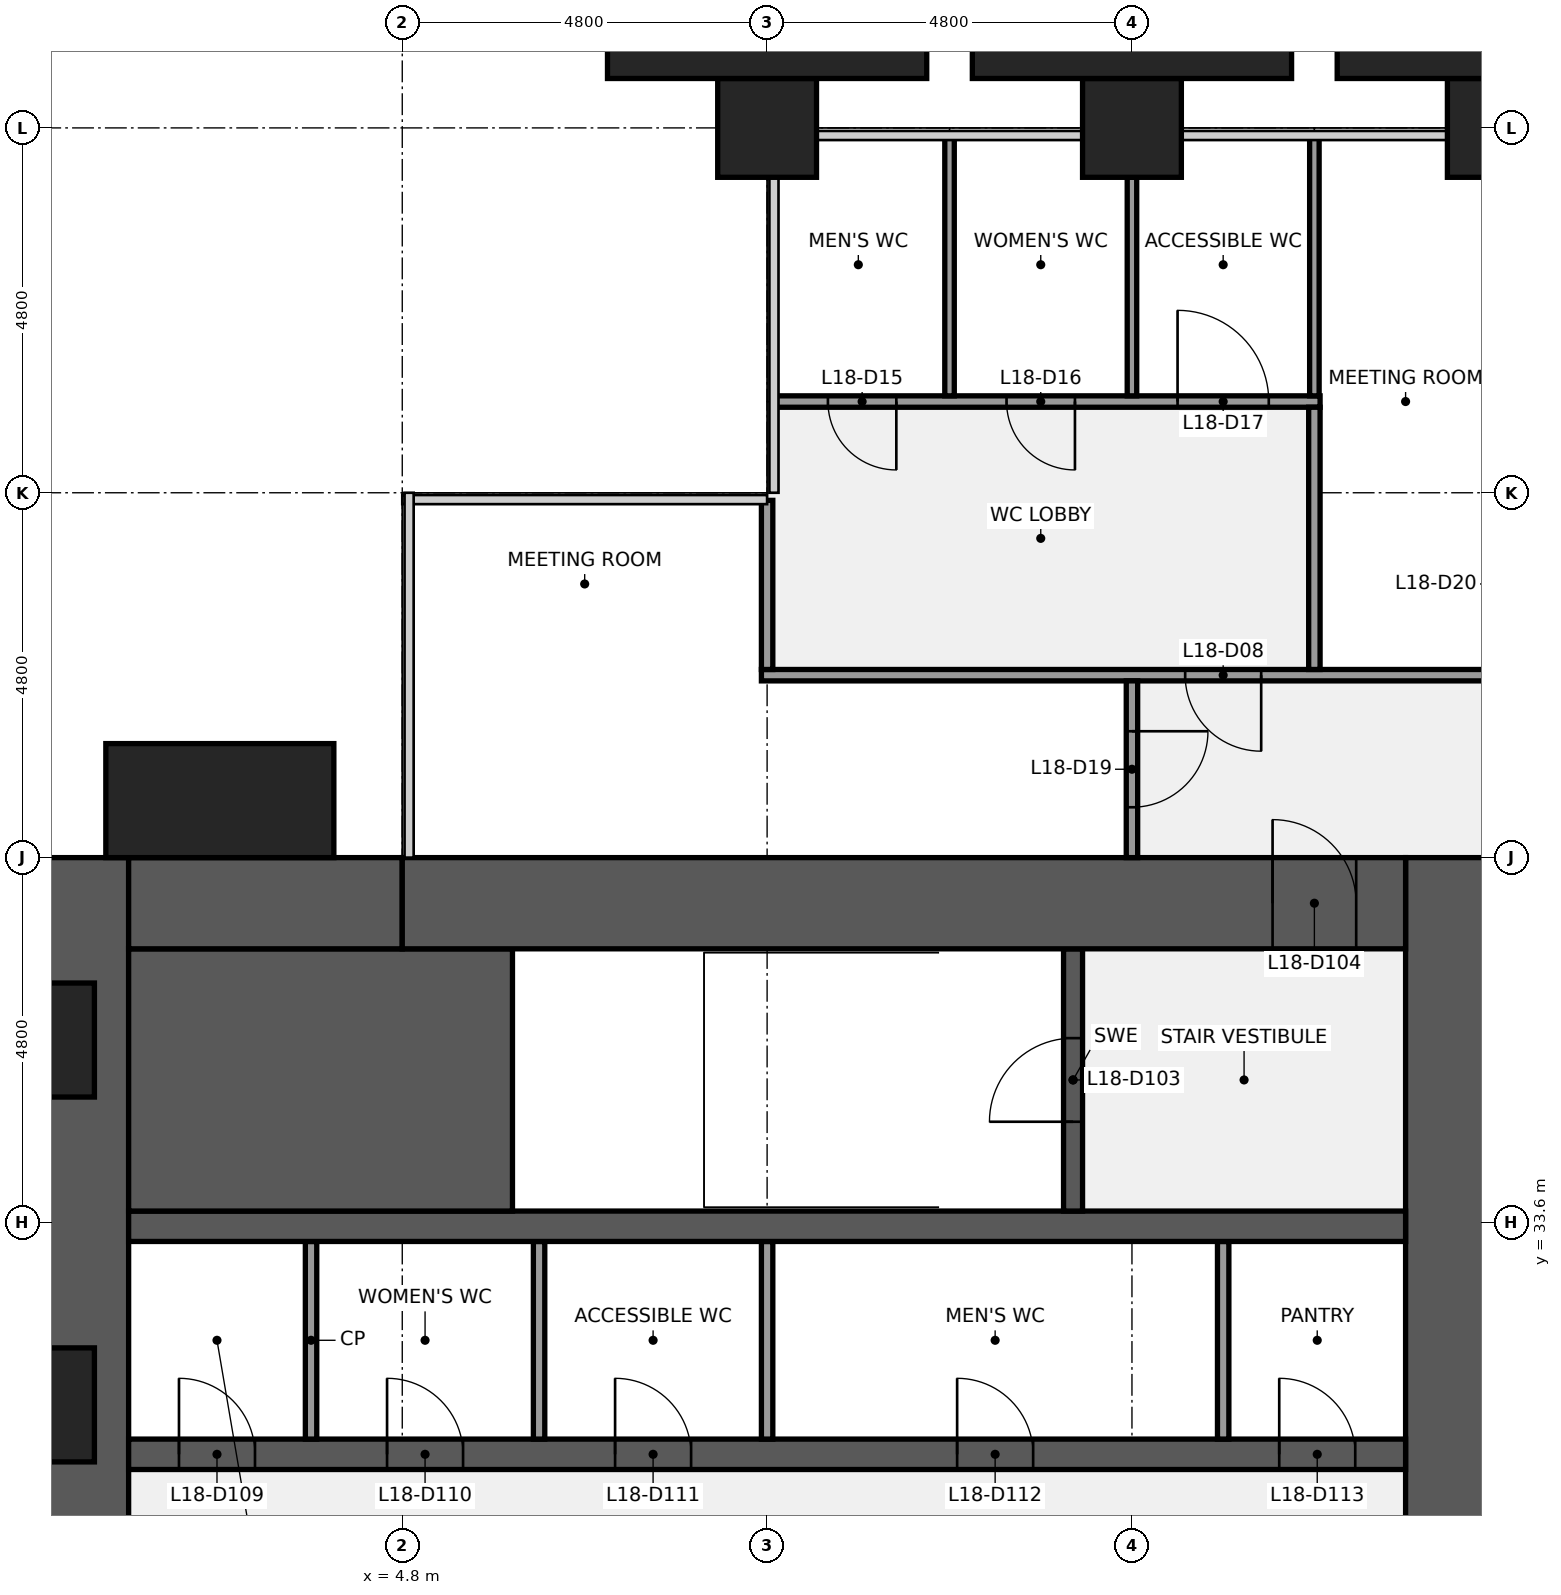
"""IFC4 building model, lengths in metres.
Left out: names, types, materials, properties, quantities, classifications, styles, units other than length and angle.
Written with IfcOpenShell. Run it as: python <this file> out.ifc"""

import sys

from ifc_helpers import new_model, si_unit, direction, frame, frame_2d, origin, origin_2d, place, context, subcontext, project, spatial, rectangle, extrude, element, fill, save


model = new_model("IFC4")
c1 = context("Model", 3, precision=1e-05, world=origin(), true_north=direction((0.0, 1.0)))
c2 = subcontext(c1, "Body", "Model", "MODEL_VIEW")
j1 = project(units=[si_unit("LENGTHUNIT", "METRE"), si_unit("PLANEANGLEUNIT", "RADIAN")], contexts=[c1])
p1 = place(None, origin())
s1 = spatial("IfcSite", under=j1, at=p1, CompositionType="ELEMENT")
p2 = place(p1, origin())
s2 = spatial("IfcBuilding", under=s1, at=p2, CompositionType="ELEMENT")
p3 = place(p2, frame((0.0, 0.0, 83.0)))
s3 = spatial("IfcBuildingStorey", under=s2, at=p3, CompositionType="ELEMENT", Elevation=83.0)
for number, where, z_axis, x_axis in (
    (1, (9.6, 48.0, 0.0), (0.0, 0.0, 1.0), (1.0, 0.0, 0.0)),
    (2, (14.4, 48.0, 0.0), (0.0, 0.0, 1.0), (1.0, 0.0, 0.0)),
    (3, (19.2, 48.0, 0.0), (0.0, 0.0, 1.0), (1.0, 0.0, 0.0)),
):
    element("IfcColumn", number, at=place(p3, frame(where, z_axis=z_axis, x_axis=x_axis)), inside=s3, PredefinedType="COLUMN", context=c2, shape_type="SweptSolid", body=[
        extrude(rectangle(XDim=1.3, YDim=1.3, at=origin_2d()), origin(), (0.0, 0.0, 1.0), 4.0),
    ])
p4 = place(p3, frame((0.6, 9.6, 0.0), z_axis=(0.0, 0.0, 1.0), x_axis=(0.0, 1.0, 0.0)))
e4 = element("IfcWall", 4, at=p4, inside=s3, PredefinedType="SHEAR", context=c2, shape_type="SweptSolid", body=[
    extrude(rectangle(XDim=28.8, YDim=1.2, at=frame_2d((14.4, 0.0))), origin(), (0.0, 0.0, 1.0), 3.7),
])
p5 = place(p4, frame((8.85, 0.0, 0.9)))
e5 = element("IfcOpeningElement", 5, at=p5, cuts=e4, PredefinedType="OPENING", context=c2, shape_type="SweptSolid", body=[
    extrude(rectangle(XDim=1.5, YDim=1.5, at=frame_2d((0.75, 0.75))), frame((0.0, 0.61, 0.0), z_axis=(0.0, -1.0, 0.0), x_axis=(1.0, 0.0, 0.0)), (0.0, 0.0, 1.0), 1.22),
])
p6 = place(p4, frame((18.45, 0.0, 0.9)))
e6 = element("IfcOpeningElement", 6, at=p6, cuts=e4, PredefinedType="OPENING", context=c2, shape_type="SweptSolid", body=[
    extrude(rectangle(XDim=1.5, YDim=1.5, at=frame_2d((0.75, 0.75))), frame((0.0, 0.61, 0.0), z_axis=(0.0, -1.0, 0.0), x_axis=(1.0, 0.0, 0.0)), (0.0, 0.0, 1.0), 1.22),
])
p7 = place(p3, frame((18.6, 38.4, 0.0), z_axis=(0.0, 0.0, 1.0), x_axis=(0.0, -1.0, 0.0)))
e7 = element("IfcWall", 7, at=p7, inside=s3, PredefinedType="SHEAR", context=c2, shape_type="SweptSolid", body=[
    extrude(rectangle(XDim=28.8, YDim=1.2, at=frame_2d((14.4, 0.0))), origin(), (0.0, 0.0, 1.0), 3.7),
])
p8 = place(p7, frame((18.3, 0.0, 0.0)))
e8 = element("IfcOpeningElement", 8, at=p8, cuts=e7, PredefinedType="OPENING", context=c2, shape_type="SweptSolid", body=[
    extrude(rectangle(XDim=1.8, YDim=2.1, at=frame_2d((0.9, 1.05))), frame((0.0, 0.61, 0.0), z_axis=(0.0, -1.0, 0.0), x_axis=(1.0, 0.0, 0.0)), (0.0, 0.0, 1.0), 1.22),
])
p9 = place(p7, frame((8.7, 0.0, 0.0)))
e9 = element("IfcOpeningElement", 9, at=p9, cuts=e7, PredefinedType="OPENING", context=c2, shape_type="SweptSolid", body=[
    extrude(rectangle(XDim=1.8, YDim=2.1, at=frame_2d((0.9, 1.05))), frame((0.0, 0.61, 0.0), z_axis=(0.0, -1.0, 0.0), x_axis=(1.0, 0.0, 0.0)), (0.0, 0.0, 1.0), 1.22),
])
p10 = place(p3, frame((1.2, 30.55, 0.0), z_axis=(0.0, 0.0, 1.0), x_axis=(1.0, 0.0, 0.0)))
e10 = element("IfcWall", 10, at=p10, inside=s3, PredefinedType="SHEAR", context=c2, shape_type="SweptSolid", body=[
    extrude(rectangle(XDim=16.8, YDim=0.4, at=frame_2d((8.4, 0.0))), origin(), (0.0, 0.0, 1.0), 3.7),
])
p11 = place(p10, frame((0.663, 0.0, 0.0)))
e11 = element("IfcOpeningElement", 11, at=p11, cuts=e10, PredefinedType="OPENING", context=c2, shape_type="SweptSolid", body=[
    extrude(rectangle(XDim=1.0, YDim=2.1, at=frame_2d((0.5, 1.05))), frame((0.0, 0.21, 0.0), z_axis=(0.0, -1.0, 0.0), x_axis=(1.0, 0.0, 0.0)), (0.0, 0.0, 1.0), 0.42),
])
p12 = place(p10, frame((3.4, 0.0, 0.0)))
e12 = element("IfcOpeningElement", 12, at=p12, cuts=e10, PredefinedType="OPENING", context=c2, shape_type="SweptSolid", body=[
    extrude(rectangle(XDim=1.0, YDim=2.1, at=frame_2d((0.5, 1.05))), frame((0.0, 0.21, 0.0), z_axis=(0.0, -1.0, 0.0), x_axis=(1.0, 0.0, 0.0)), (0.0, 0.0, 1.0), 0.42),
])
p13 = place(p10, frame((6.4, 0.0, 0.0)))
e13 = element("IfcOpeningElement", 13, at=p13, cuts=e10, PredefinedType="OPENING", context=c2, shape_type="SweptSolid", body=[
    extrude(rectangle(XDim=1.0, YDim=2.1, at=frame_2d((0.5, 1.05))), frame((0.0, 0.21, 0.0), z_axis=(0.0, -1.0, 0.0), x_axis=(1.0, 0.0, 0.0)), (0.0, 0.0, 1.0), 0.42),
])
p14 = place(p10, frame((10.9, 0.0, 0.0)))
e14 = element("IfcOpeningElement", 14, at=p14, cuts=e10, PredefinedType="OPENING", context=c2, shape_type="SweptSolid", body=[
    extrude(rectangle(XDim=1.0, YDim=2.1, at=frame_2d((0.5, 1.05))), frame((0.0, 0.21, 0.0), z_axis=(0.0, -1.0, 0.0), x_axis=(1.0, 0.0, 0.0)), (0.0, 0.0, 1.0), 0.42),
])
p15 = place(p10, frame((15.137, 0.0, 0.0)))
e15 = element("IfcOpeningElement", 15, at=p15, cuts=e10, PredefinedType="OPENING", context=c2, shape_type="SweptSolid", body=[
    extrude(rectangle(XDim=1.0, YDim=2.1, at=frame_2d((0.5, 1.05))), frame((0.0, 0.21, 0.0), z_axis=(0.0, -1.0, 0.0), x_axis=(1.0, 0.0, 0.0)), (0.0, 0.0, 1.0), 0.42),
])
for number, where, z_axis, x_axis in (
    (16, (3.6, 30.75, 0.0), (0.0, 0.0, 1.0), (0.0, 1.0, 0.0)),
    (17, (6.6, 30.75, 0.0), (0.0, 0.0, 1.0), (0.0, 1.0, 0.0)),
    (18, (9.6, 30.75, 0.0), (0.0, 0.0, 1.0), (0.0, 1.0, 0.0)),
    (19, (15.6, 30.75, 0.0), (0.0, 0.0, 1.0), (0.0, 1.0, 0.0)),
):
    element("IfcWall", number, at=place(p3, frame(where, z_axis=z_axis, x_axis=x_axis)), inside=s3, PredefinedType="PARTITIONING", context=c2, shape_type="SweptSolid", body=[
        extrude(rectangle(XDim=2.6, YDim=0.15, at=frame_2d((1.3, 0.0))), origin(), (0.0, 0.0, 1.0), 3.7),
    ])
p16 = place(p3, frame((1.2, 33.55, 0.0), z_axis=(0.0, 0.0, 1.0), x_axis=(1.0, 0.0, 0.0)))
e20 = element("IfcWall", 20, at=p16, inside=s3, PredefinedType="SHEAR", context=c2, shape_type="SweptSolid", body=[
    extrude(rectangle(XDim=16.8, YDim=0.4, at=frame_2d((8.4, 0.0))), origin(), (0.0, 0.0, 1.0), 3.7),
])
p17 = place(p3, frame((1.2, 35.475, 0.0), z_axis=(0.0, 0.0, 1.0), x_axis=(1.0, 0.0, 0.0)))
e21 = element("IfcWall", 21, at=p17, inside=s3, PredefinedType="SHEAR", context=c2, shape_type="SweptSolid", body=[
    extrude(rectangle(XDim=5.05, YDim=3.45, at=frame_2d((2.525, 0.0))), origin(), (0.0, 0.0, 1.0), 3.7),
])
p18 = place(p3, frame((13.625, 33.75, 0.0), z_axis=(0.0, 0.0, 1.0), x_axis=(0.0, 1.0, 0.0)))
e22 = element("IfcWall", 22, at=p18, inside=s3, PredefinedType="SHEAR", context=c2, shape_type="SweptSolid", body=[
    extrude(rectangle(XDim=3.45, YDim=0.25, at=frame_2d((1.725, 0.0))), origin(), (0.0, 0.0, 1.0), 3.7),
])
p19 = place(p18, frame((1.175, 0.0, 0.0)))
e23 = element("IfcOpeningElement", 23, at=p19, cuts=e22, PredefinedType="OPENING", context=c2, shape_type="SweptSolid", body=[
    extrude(rectangle(XDim=1.1, YDim=2.1, at=frame_2d((0.55, 1.05))), frame((0.0, 0.135, 0.0), z_axis=(0.0, -1.0, 0.0), x_axis=(1.0, 0.0, 0.0)), (0.0, 0.0, 1.0), 0.27),
])
p20 = place(p3, frame((1.2, 37.8, 0.0), z_axis=(0.0, 0.0, 1.0), x_axis=(1.0, 0.0, 0.0)))
e24 = element("IfcWall", 24, at=p20, inside=s3, PredefinedType="SHEAR", context=c2, shape_type="SweptSolid", body=[
    extrude(rectangle(XDim=3.6, YDim=1.2, at=frame_2d((1.8, 0.0))), origin(), (0.0, 0.0, 1.0), 3.7),
])
p21 = place(p3, frame((4.8, 37.8, 0.0), z_axis=(0.0, 0.0, 1.0), x_axis=(1.0, 0.0, 0.0)))
e25 = element("IfcWall", 25, at=p21, inside=s3, PredefinedType="SHEAR", context=c2, shape_type="SweptSolid", body=[
    extrude(rectangle(XDim=13.2, YDim=1.2, at=frame_2d((6.6, 0.0))), origin(), (0.0, 0.0, 1.0), 3.7),
])
p22 = place(p21, frame((11.45, 0.0, 0.0)))
e26 = element("IfcOpeningElement", 26, at=p22, cuts=e25, PredefinedType="OPENING", context=c2, shape_type="SweptSolid", body=[
    extrude(rectangle(XDim=1.1, YDim=2.1, at=frame_2d((0.55, 1.05))), frame((0.0, 0.61, 0.0), z_axis=(0.0, -1.0, 0.0), x_axis=(1.0, 0.0, 0.0)), (0.0, 0.0, 1.0), 1.22),
])
p23 = place(p3, frame((9.525, 40.8, 0.0), z_axis=(0.0, 0.0, 1.0), x_axis=(1.0, 0.0, 0.0)))
e27 = element("IfcWall", 27, at=p23, inside=s3, PredefinedType="PARTITIONING", context=c2, shape_type="SweptSolid", body=[
    extrude(rectangle(XDim=9.75, YDim=0.15, at=frame_2d((4.875, 0.0))), origin(), (0.0, 0.0, 1.0), 2.709),
])
p24 = place(p23, frame((5.575, 0.0, 0.0)))
e28 = element("IfcOpeningElement", 28, at=p24, cuts=e27, PredefinedType="OPENING", context=c2, shape_type="SweptSolid", body=[
    extrude(rectangle(XDim=1.0, YDim=2.1, at=frame_2d((0.5, 1.05))), frame((0.0, 0.085, 0.0), z_axis=(0.0, -1.0, 0.0), x_axis=(1.0, 0.0, 0.0)), (0.0, 0.0, 1.0), 0.17),
])
p25 = place(p3, frame((9.7, 44.4, 0.0), z_axis=(0.0, 0.0, 1.0), x_axis=(1.0, 0.0, 0.0)))
e29 = element("IfcWall", 29, at=p25, inside=s3, PredefinedType="PARTITIONING", context=c2, shape_type="SweptSolid", body=[
    extrude(rectangle(XDim=7.175, YDim=0.15, at=frame_2d((3.587, 0.0))), origin(), (0.0, 0.0, 1.0), 2.709),
])
p26 = place(p25, frame((0.7, 0.0, 0.0)))
e30 = element("IfcOpeningElement", 30, at=p26, cuts=e29, PredefinedType="OPENING", context=c2, shape_type="SweptSolid", body=[
    extrude(rectangle(XDim=0.9, YDim=2.1, at=frame_2d((0.45, 1.05))), frame((0.0, 0.085, 0.0), z_axis=(0.0, -1.0, 0.0), x_axis=(1.0, 0.0, 0.0)), (0.0, 0.0, 1.0), 0.17),
])
p27 = place(p25, frame((3.05, 0.0, 0.0)))
e31 = element("IfcOpeningElement", 31, at=p27, cuts=e29, PredefinedType="OPENING", context=c2, shape_type="SweptSolid", body=[
    extrude(rectangle(XDim=0.9, YDim=2.1, at=frame_2d((0.45, 1.05))), frame((0.0, 0.085, 0.0), z_axis=(0.0, -1.0, 0.0), x_axis=(1.0, 0.0, 0.0)), (0.0, 0.0, 1.0), 0.17),
])
p28 = place(p25, frame((5.3, 0.0, 0.0)))
e32 = element("IfcOpeningElement", 32, at=p28, cuts=e29, PredefinedType="OPENING", context=c2, shape_type="SweptSolid", body=[
    extrude(rectangle(XDim=1.2, YDim=2.1, at=frame_2d((0.6, 1.05))), frame((0.0, 0.085, 0.0), z_axis=(0.0, -1.0, 0.0), x_axis=(1.0, 0.0, 0.0)), (0.0, 0.0, 1.0), 0.17),
])
p29 = place(p3, frame((9.6, 40.875, 0.0), z_axis=(0.0, 0.0, 1.0), x_axis=(0.0, 1.0, 0.0)))
e33 = element("IfcWall", 33, at=p29, inside=s3, PredefinedType="PARTITIONING", context=c2, shape_type="SweptSolid", body=[
    extrude(rectangle(XDim=2.225, YDim=0.15, at=frame_2d((1.113, 0.0))), origin(), (0.0, 0.0, 1.0), 2.709),
])
p30 = place(p3, frame((12.0, 44.475, 0.0), z_axis=(0.0, 0.0, 1.0), x_axis=(0.0, 1.0, 0.0)))
e34 = element("IfcWall", 34, at=p30, inside=s3, PredefinedType="PARTITIONING", context=c2, shape_type="SweptSolid", body=[
    extrude(rectangle(XDim=3.425, YDim=0.125, at=frame_2d((1.712, 0.0))), origin(), (0.0, 0.0, 1.0), 2.709),
])
p31 = place(p3, frame((14.4, 44.475, 0.0), z_axis=(0.0, 0.0, 1.0), x_axis=(0.0, 1.0, 0.0)))
e35 = element("IfcWall", 35, at=p31, inside=s3, PredefinedType="PARTITIONING", context=c2, shape_type="SweptSolid", body=[
    extrude(rectangle(XDim=2.875, YDim=0.125, at=frame_2d((1.438, 0.0))), origin(), (0.0, 0.0, 1.0), 2.709),
])
p32 = place(p3, frame((14.4, 38.4, 0.0), z_axis=(0.0, 0.0, 1.0), x_axis=(0.0, 1.0, 0.0)))
e36 = element("IfcWall", 36, at=p32, inside=s3, PredefinedType="PARTITIONING", context=c2, shape_type="SweptSolid", body=[
    extrude(rectangle(XDim=2.325, YDim=0.15, at=frame_2d((1.163, 0.0))), origin(), (0.0, 0.0, 1.0), 2.709),
])
p33 = place(p32, frame((0.663, 0.0, 0.0)))
e37 = element("IfcOpeningElement", 37, at=p33, cuts=e36, PredefinedType="OPENING", context=c2, shape_type="SweptSolid", body=[
    extrude(rectangle(XDim=1.0, YDim=2.1, at=frame_2d((0.5, 1.05))), frame((0.0, 0.085, 0.0), z_axis=(0.0, -1.0, 0.0), x_axis=(1.0, 0.0, 0.0)), (0.0, 0.0, 1.0), 0.17),
])
p34 = place(p3, frame((16.8, 44.475, 0.0), z_axis=(0.0, 0.0, 1.0), x_axis=(0.0, 1.0, 0.0)))
e38 = element("IfcWall", 38, at=p34, inside=s3, PredefinedType="PARTITIONING", context=c2, shape_type="SweptSolid", body=[
    extrude(rectangle(XDim=3.425, YDim=0.125, at=frame_2d((1.712, 0.0))), origin(), (0.0, 0.0, 1.0), 2.709),
])
p35 = place(p3, frame((16.8, 40.875, 0.0), z_axis=(0.0, 0.0, 1.0), x_axis=(0.0, 1.0, 0.0)))
e39 = element("IfcWall", 39, at=p35, inside=s3, PredefinedType="PARTITIONING", context=c2, shape_type="SweptSolid", body=[
    extrude(rectangle(XDim=3.45, YDim=0.15, at=frame_2d((1.725, 0.0))), origin(), (0.0, 0.0, 1.0), 2.709),
])
p36 = place(p3, frame((2.4, 39.15, 0.0), z_axis=(0.0, 0.0, 1.0), x_axis=(1.0, 0.0, 0.0)))
e40 = element("IfcColumn", 40, at=p36, inside=s3, PredefinedType="PILASTER", context=c2, shape_type="SweptSolid", body=[
    extrude(rectangle(XDim=3.0, YDim=1.5, at=origin_2d()), origin(), (0.0, 0.0, 1.0), 4.0),
])
for number, where, z_axis, x_axis in (
    (41, (9.6, 49.075, 0.0), (0.0, 0.0, 1.0), (1.0, 0.0, 0.0)),
    (42, (14.4, 49.075, 0.0), (0.0, 0.0, 1.0), (1.0, 0.0, 0.0)),
    (43, (19.2, 49.075, 0.0), (0.0, 0.0, 1.0), (1.0, 0.0, 0.0)),
):
    element("IfcColumn", number, at=place(p3, frame(where, z_axis=z_axis, x_axis=x_axis)), inside=s3, PredefinedType="PILASTER", context=c2, shape_type="SweptSolid", body=[
        extrude(rectangle(XDim=4.2, YDim=0.85, at=origin_2d()), origin(), (0.0, 0.0, 1.0), 4.0),
    ])
p37 = place(p19, origin())
e44 = element("IfcDoor", 44, at=p37, inside=s3, OperationType="SINGLE_SWING_LEFT", PredefinedType="DOOR", context=c2, shape_type="SweptSolid", body=[
    extrude(rectangle(XDim=1.1, YDim=2.1, at=frame_2d((0.55, 1.05))), frame((0.0, 0.025, 0.0), z_axis=(0.0, -1.0, 0.0), x_axis=(1.0, 0.0, 0.0)), (0.0, 0.0, 1.0), 0.05),
])
fill(e23, e44)
p38 = place(p22, origin())
e45 = element("IfcDoor", 45, at=p38, inside=s3, OperationType="SINGLE_SWING_LEFT", PredefinedType="DOOR", context=c2, shape_type="SweptSolid", body=[
    extrude(rectangle(XDim=1.1, YDim=2.1, at=frame_2d((0.55, 1.05))), frame((0.0, 0.025, 0.0), z_axis=(0.0, -1.0, 0.0), x_axis=(1.0, 0.0, 0.0)), (0.0, 0.0, 1.0), 0.05),
])
fill(e26, e45)
p39 = place(p11, origin())
e46 = element("IfcDoor", 46, at=p39, inside=s3, OperationType="SINGLE_SWING_LEFT", PredefinedType="DOOR", context=c2, shape_type="SweptSolid", body=[
    extrude(rectangle(XDim=1.0, YDim=2.1, at=frame_2d((0.5, 1.05))), frame((0.0, 0.025, 0.0), z_axis=(0.0, -1.0, 0.0), x_axis=(1.0, 0.0, 0.0)), (0.0, 0.0, 1.0), 0.05),
])
fill(e11, e46)
p40 = place(p12, origin())
e47 = element("IfcDoor", 47, at=p40, inside=s3, OperationType="SINGLE_SWING_LEFT", PredefinedType="DOOR", context=c2, shape_type="SweptSolid", body=[
    extrude(rectangle(XDim=1.0, YDim=2.1, at=frame_2d((0.5, 1.05))), frame((0.0, 0.025, 0.0), z_axis=(0.0, -1.0, 0.0), x_axis=(1.0, 0.0, 0.0)), (0.0, 0.0, 1.0), 0.05),
])
fill(e12, e47)
p41 = place(p13, origin())
e48 = element("IfcDoor", 48, at=p41, inside=s3, OperationType="SINGLE_SWING_LEFT", PredefinedType="DOOR", context=c2, shape_type="SweptSolid", body=[
    extrude(rectangle(XDim=1.0, YDim=2.1, at=frame_2d((0.5, 1.05))), frame((0.0, 0.025, 0.0), z_axis=(0.0, -1.0, 0.0), x_axis=(1.0, 0.0, 0.0)), (0.0, 0.0, 1.0), 0.05),
])
fill(e13, e48)
p42 = place(p14, origin())
e49 = element("IfcDoor", 49, at=p42, inside=s3, OperationType="SINGLE_SWING_LEFT", PredefinedType="DOOR", context=c2, shape_type="SweptSolid", body=[
    extrude(rectangle(XDim=1.0, YDim=2.1, at=frame_2d((0.5, 1.05))), frame((0.0, 0.025, 0.0), z_axis=(0.0, -1.0, 0.0), x_axis=(1.0, 0.0, 0.0)), (0.0, 0.0, 1.0), 0.05),
])
fill(e14, e49)
p43 = place(p15, origin())
e50 = element("IfcDoor", 50, at=p43, inside=s3, OperationType="SINGLE_SWING_LEFT", PredefinedType="DOOR", context=c2, shape_type="SweptSolid", body=[
    extrude(rectangle(XDim=1.0, YDim=2.1, at=frame_2d((0.5, 1.05))), frame((0.0, 0.025, 0.0), z_axis=(0.0, -1.0, 0.0), x_axis=(1.0, 0.0, 0.0)), (0.0, 0.0, 1.0), 0.05),
])
fill(e15, e50)
p44 = place(p24, origin())
e51 = element("IfcDoor", 51, at=p44, inside=s3, OperationType="SINGLE_SWING_RIGHT", PredefinedType="DOOR", context=c2, shape_type="SweptSolid", body=[
    extrude(rectangle(XDim=1.0, YDim=2.1, at=frame_2d((0.5, 1.05))), frame((0.0, 0.025, 0.0), z_axis=(0.0, -1.0, 0.0), x_axis=(1.0, 0.0, 0.0)), (0.0, 0.0, 1.0), 0.05),
])
fill(e28, e51)
p45 = place(p26, origin())
e52 = element("IfcDoor", 52, at=p45, inside=s3, OperationType="SINGLE_SWING_RIGHT", PredefinedType="DOOR", context=c2, shape_type="SweptSolid", body=[
    extrude(rectangle(XDim=0.9, YDim=2.1, at=frame_2d((0.45, 1.05))), frame((0.0, 0.025, 0.0), z_axis=(0.0, -1.0, 0.0), x_axis=(1.0, 0.0, 0.0)), (0.0, 0.0, 1.0), 0.05),
])
fill(e30, e52)
p46 = place(p27, origin())
e53 = element("IfcDoor", 53, at=p46, inside=s3, OperationType="SINGLE_SWING_RIGHT", PredefinedType="DOOR", context=c2, shape_type="SweptSolid", body=[
    extrude(rectangle(XDim=0.9, YDim=2.1, at=frame_2d((0.45, 1.05))), frame((0.0, 0.025, 0.0), z_axis=(0.0, -1.0, 0.0), x_axis=(1.0, 0.0, 0.0)), (0.0, 0.0, 1.0), 0.05),
])
fill(e31, e53)
p47 = place(p28, origin())
e54 = element("IfcDoor", 54, at=p47, inside=s3, OperationType="SINGLE_SWING_LEFT", PredefinedType="DOOR", context=c2, shape_type="SweptSolid", body=[
    extrude(rectangle(XDim=1.2, YDim=2.1, at=frame_2d((0.6, 1.05))), frame((0.0, 0.025, 0.0), z_axis=(0.0, -1.0, 0.0), x_axis=(1.0, 0.0, 0.0)), (0.0, 0.0, 1.0), 0.05),
])
fill(e32, e54)
p48 = place(p33, origin())
e55 = element("IfcDoor", 55, at=p48, inside=s3, OperationType="SINGLE_SWING_RIGHT", PredefinedType="DOOR", context=c2, shape_type="SweptSolid", body=[
    extrude(rectangle(XDim=1.0, YDim=2.1, at=frame_2d((0.5, 1.05))), frame((0.0, 0.025, 0.0), z_axis=(0.0, -1.0, 0.0), x_axis=(1.0, 0.0, 0.0)), (0.0, 0.0, 1.0), 0.05),
])
fill(e37, e55)
save(model, sys.argv[1])
